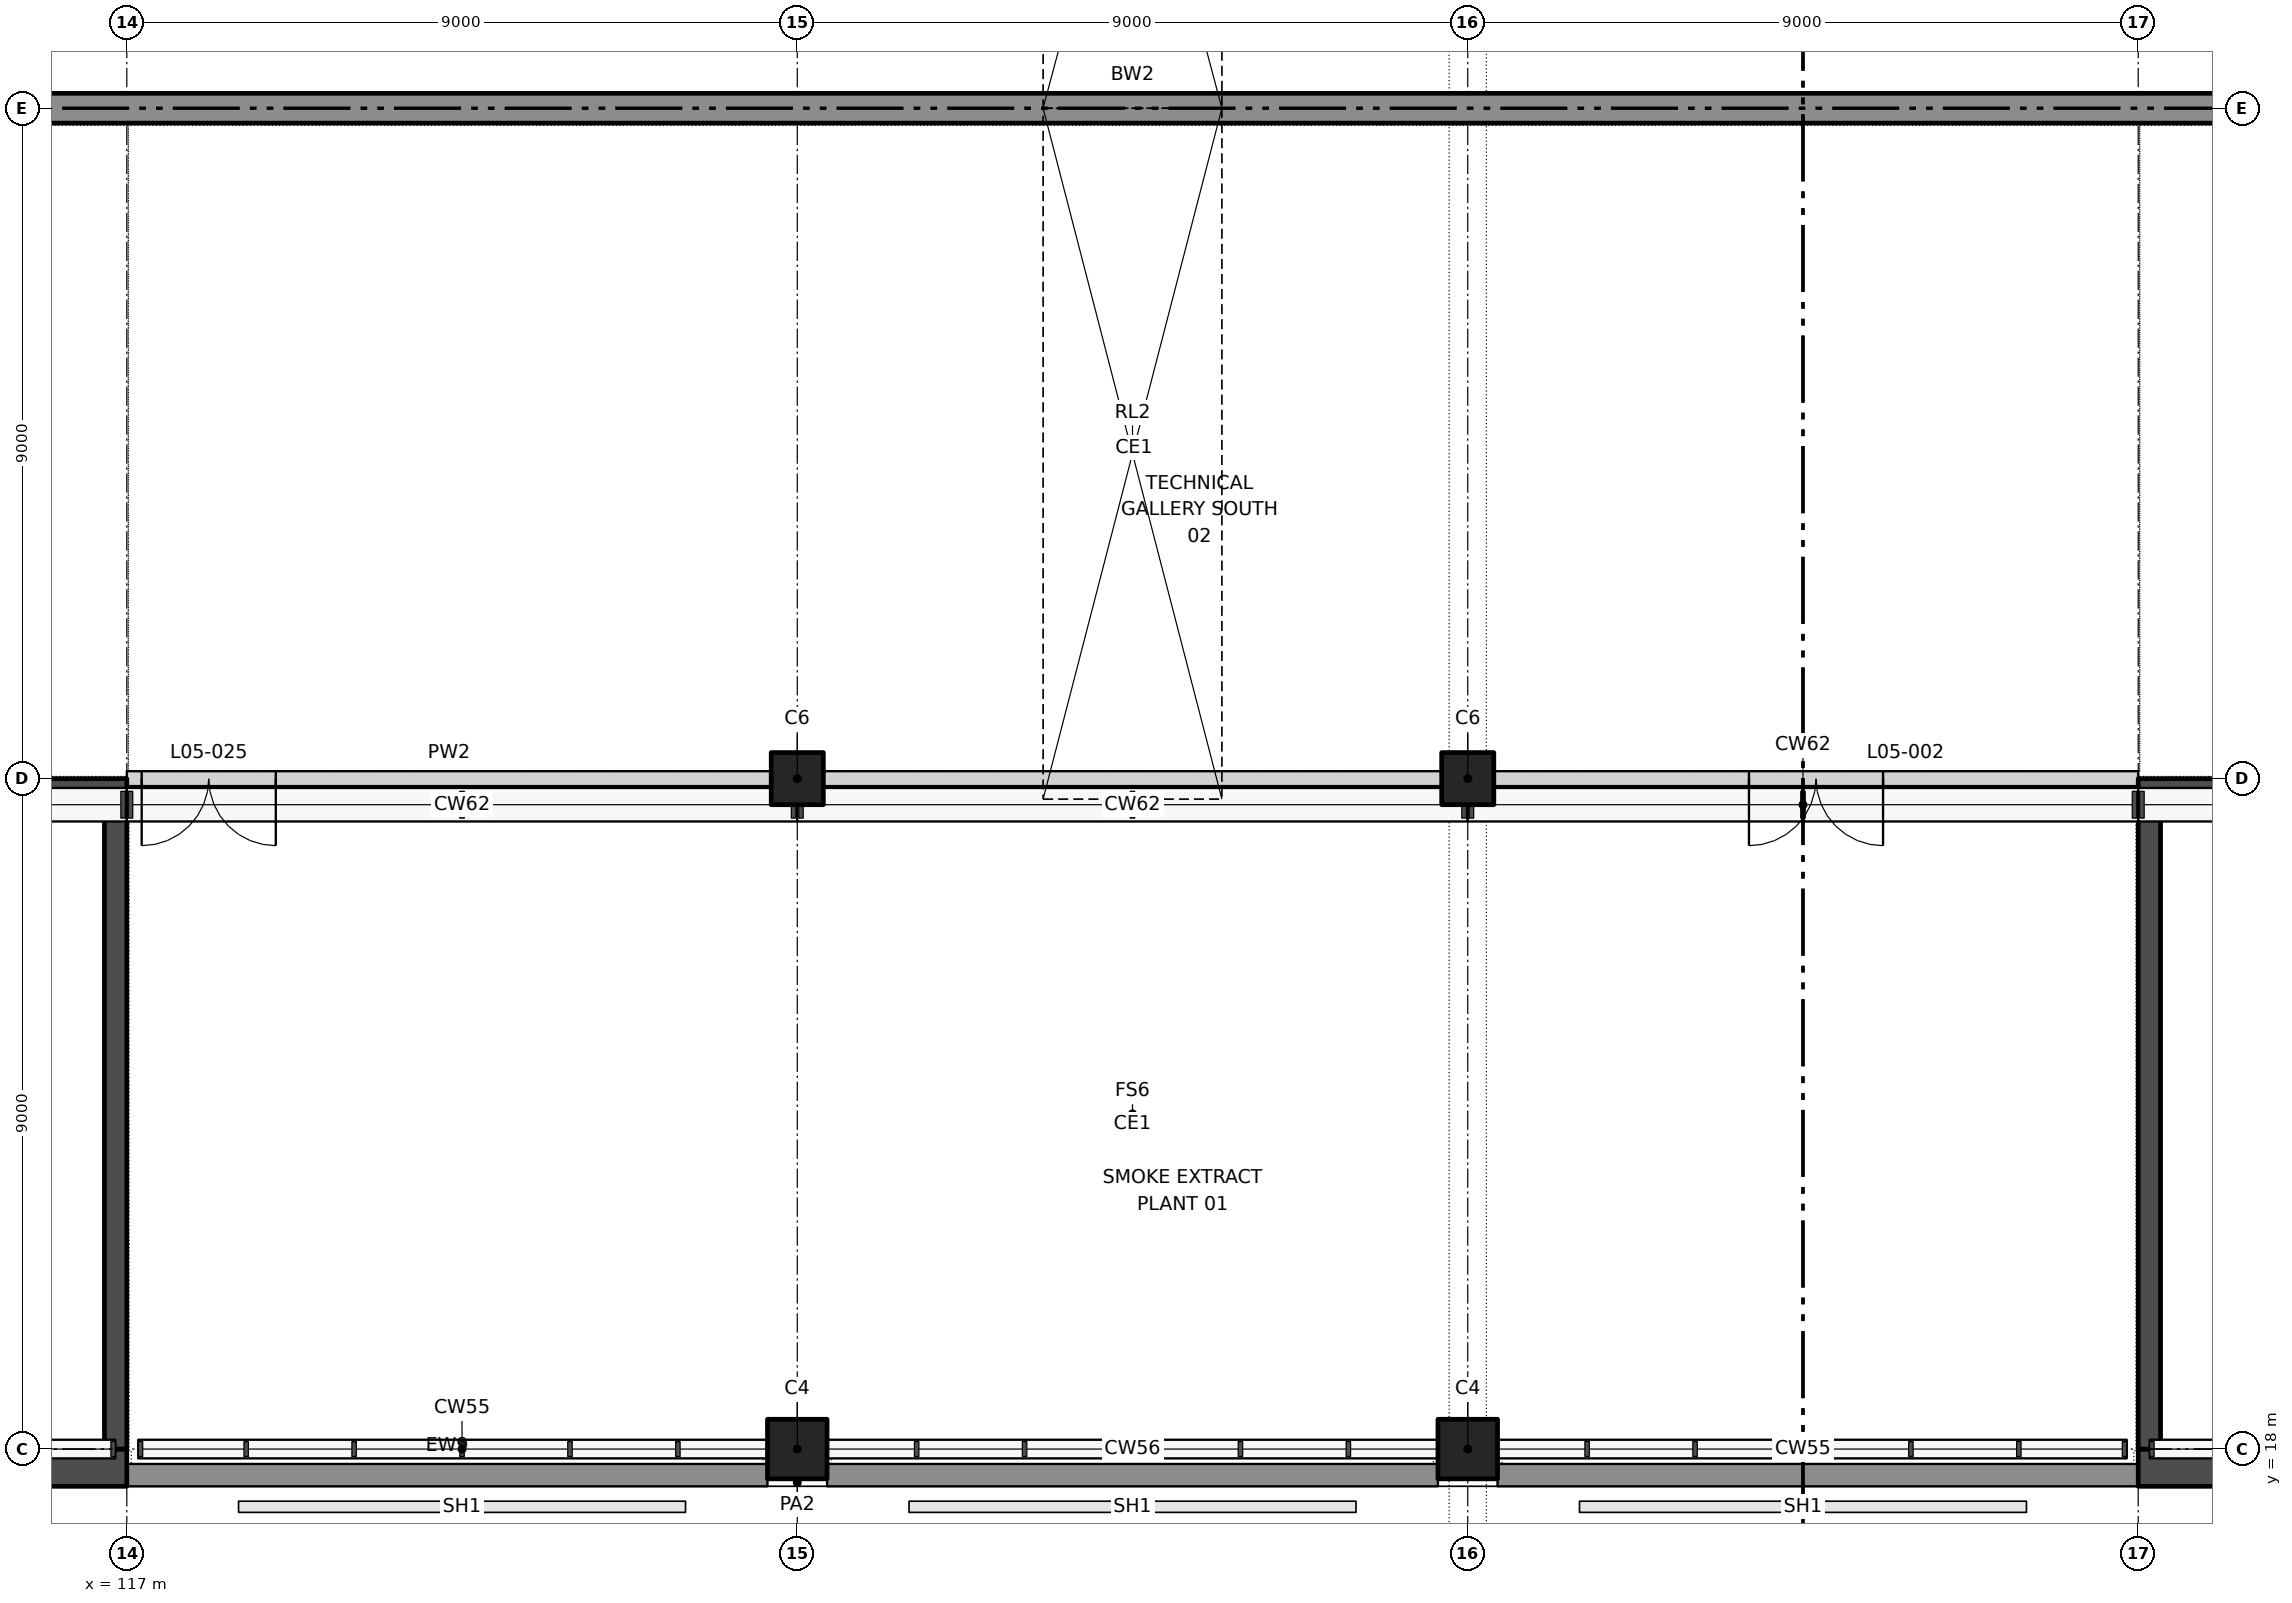
"""IFC4 building model, lengths in metres.
Left out: names, types, materials, properties, quantities, classifications, styles, units other than length and angle.
Written with IfcOpenShell. Run it as: python <this file> out.ifc"""

import sys

from ifc_helpers import new_model, si_unit, direction, frame, frame_2d, origin, origin_2d, place, context, subcontext, project, spatial, polyline, rectangle, outline, extrude, element, fill, save


model = new_model("IFC4")
c1 = context("Model", 3, precision=1e-05, world=origin(), true_north=direction((0.0, 1.0)))
c2 = subcontext(c1, "Body", "Model", "MODEL_VIEW")
j1 = project(units=[si_unit("LENGTHUNIT", "METRE"), si_unit("PLANEANGLEUNIT", "RADIAN")], contexts=[c1])
p1 = place(None, origin())
s1 = spatial("IfcSite", under=j1, at=p1, CompositionType="ELEMENT")
p2 = place(p1, origin())
s2 = spatial("IfcBuilding", under=s1, at=p2, CompositionType="ELEMENT")
p3 = place(p2, frame((0.0, 0.0, 33.5)))
s3 = spatial("IfcBuildingStorey", under=s2, at=p3, CompositionType="ELEMENT", Elevation=33.5)
for number, where, z_axis, x_axis in (
    (1, (126.0, 18.0, 0.0), (0.0, 0.0, 1.0), (1.0, 0.0, 0.0)),
    (2, (135.0, 18.0, 0.0), (0.0, 0.0, 1.0), (1.0, 0.0, 0.0)),
):
    element("IfcColumn", number, at=place(p3, frame(where, z_axis=z_axis, x_axis=x_axis)), inside=s3, PredefinedType="COLUMN", context=c2, shape_type="SweptSolid", body=[
        extrude(rectangle(XDim=0.8, YDim=0.8, at=origin_2d()), origin(), (0.0, 0.0, 1.0), 4.0),
    ])
for number, where, z_axis, x_axis in (
    (3, (126.0, 27.0, 0.0), (0.0, 0.0, 1.0), (1.0, 0.0, 0.0)),
    (4, (135.0, 27.0, 0.0), (0.0, 0.0, 1.0), (1.0, 0.0, 0.0)),
):
    element("IfcColumn", number, at=place(p3, frame(where, z_axis=z_axis, x_axis=x_axis)), inside=s3, PredefinedType="COLUMN", context=c2, shape_type="SweptSolid", body=[
        extrude(rectangle(XDim=0.7, YDim=0.7, at=origin_2d()), origin(), (0.0, 0.0, 1.0), 4.0),
    ])
p4 = place(p3, frame((90.0, 36.0, 0.0), z_axis=(0.0, 0.0, 1.0), x_axis=(1.0, 0.0, 0.0)))
e5 = element("IfcWall", 5, at=p4, inside=s3, PredefinedType="SOLIDWALL", context=c2, shape_type="SweptSolid", body=[
    extrude(rectangle(XDim=81.0, YDim=0.4, at=frame_2d((40.5, 0.0))), origin(), (0.0, 0.0, 1.0), 4.0),
])
p5 = place(p4, frame((3.9, 0.0, 0.0)))
e6 = element("IfcOpeningElement", 6, at=p5, cuts=e5, PredefinedType="OPENING", context=c2, shape_type="SweptSolid", body=[
    extrude(rectangle(XDim=1.2, YDim=2.1, at=frame_2d((0.6, 1.05))), frame((0.0, 0.21, 0.0), z_axis=(0.0, -1.0, 0.0), x_axis=(1.0, 0.0, 0.0)), (0.0, 0.0, 1.0), 0.42),
])
p6 = place(p4, frame((75.9, 0.0, 0.0)))
e7 = element("IfcOpeningElement", 7, at=p6, cuts=e5, PredefinedType="OPENING", context=c2, shape_type="SweptSolid", body=[
    extrude(rectangle(XDim=1.2, YDim=2.1, at=frame_2d((0.6, 1.05))), frame((0.0, 0.21, 0.0), z_axis=(0.0, -1.0, 0.0), x_axis=(1.0, 0.0, 0.0)), (0.0, 0.0, 1.0), 0.42),
])
p7 = place(p3, frame((135.35, 27.0, 0.0), z_axis=(0.0, 0.0, 1.0), x_axis=(1.0, 0.0, 0.0)))
e8 = element("IfcWall", 8, at=p7, inside=s3, PredefinedType="PARTITIONING", context=c2, shape_type="SweptSolid", body=[
    extrude(rectangle(XDim=8.65, YDim=0.2, at=frame_2d((4.325, 0.0))), origin(), (0.0, 0.0, 1.0), 4.0),
])
p8 = place(p7, frame((3.425, 0.0, 0.0)))
e9 = element("IfcOpeningElement", 9, at=p8, cuts=e8, PredefinedType="OPENING", context=c2, shape_type="SweptSolid", body=[
    extrude(rectangle(XDim=1.8, YDim=2.1, at=frame_2d((0.9, 1.05))), frame((0.0, 0.11, 0.0), z_axis=(0.0, -1.0, 0.0), x_axis=(1.0, 0.0, 0.0)), (0.0, 0.0, 1.0), 0.22),
])
p9 = place(p3, frame((126.35, 27.0, 0.0), z_axis=(0.0, 0.0, 1.0), x_axis=(1.0, 0.0, 0.0)))
e10 = element("IfcWall", 10, at=p9, inside=s3, PredefinedType="PARTITIONING", context=c2, shape_type="SweptSolid", body=[
    extrude(rectangle(XDim=8.3, YDim=0.2, at=frame_2d((4.15, 0.0))), origin(), (0.0, 0.0, 1.0), 4.0),
])
p10 = place(p3, frame((117.0, 27.0, 0.0), z_axis=(0.0, 0.0, 1.0), x_axis=(1.0, 0.0, 0.0)))
e11 = element("IfcWall", 11, at=p10, inside=s3, PredefinedType="PARTITIONING", context=c2, shape_type="SweptSolid", body=[
    extrude(rectangle(XDim=8.65, YDim=0.2, at=frame_2d((4.325, 0.0))), origin(), (0.0, 0.0, 1.0), 4.0),
])
p11 = place(p10, frame((0.2, 0.0, 0.0)))
e12 = element("IfcOpeningElement", 12, at=p11, cuts=e11, PredefinedType="OPENING", context=c2, shape_type="SweptSolid", body=[
    extrude(rectangle(XDim=1.8, YDim=2.1, at=frame_2d((0.9, 1.05))), frame((0.0, 0.11, 0.0), z_axis=(0.0, -1.0, 0.0), x_axis=(1.0, 0.0, 0.0)), (0.0, 0.0, 1.0), 0.22),
])
p12 = place(p3, frame((117.0, 17.65, 0.0), z_axis=(0.0, 0.0, 1.0), x_axis=(1.0, 0.0, 0.0)))
e13 = element("IfcWall", 13, at=p12, inside=s3, PredefinedType="SOLIDWALL", context=c2, shape_type="SweptSolid", body=[
    extrude(rectangle(XDim=8.6, YDim=0.3, at=frame_2d((4.3, 0.0))), origin(), (0.0, 0.0, 1.0), 4.0),
])
p13 = place(p3, frame((126.4, 17.65, 0.0), z_axis=(0.0, 0.0, 1.0), x_axis=(1.0, 0.0, 0.0)))
e14 = element("IfcWall", 14, at=p13, inside=s3, PredefinedType="SOLIDWALL", context=c2, shape_type="SweptSolid", body=[
    extrude(rectangle(XDim=8.2, YDim=0.3, at=frame_2d((4.1, 0.0))), origin(), (0.0, 0.0, 1.0), 4.0),
])
p14 = place(p3, frame((135.4, 17.65, 0.0), z_axis=(0.0, 0.0, 1.0), x_axis=(1.0, 0.0, 0.0)))
e15 = element("IfcWall", 15, at=p14, inside=s3, PredefinedType="SOLIDWALL", context=c2, shape_type="SweptSolid", body=[
    extrude(rectangle(XDim=8.6, YDim=0.3, at=frame_2d((4.3, 0.0))), origin(), (0.0, 0.0, 1.0), 4.0),
])
p15 = place(p3, frame((117.0, 26.85, 0.0), z_axis=(0.0, 0.0, 1.0), x_axis=(-1.0, 0.0, 0.0)))
e16 = element("IfcWall", 16, at=p15, inside=s3, PredefinedType="SHEAR", context=c2, shape_type="SweptSolid", body=[
    extrude(rectangle(XDim=18.0, YDim=0.3, at=frame_2d((9.0, 0.0))), origin(), (0.0, 0.0, 1.0), 4.0),
])
p16 = place(p15, frame((8.6, 0.0, 0.0)))
e17 = element("IfcOpeningElement", 17, at=p16, cuts=e16, PredefinedType="OPENING", context=c2, shape_type="SweptSolid", body=[
    extrude(rectangle(XDim=1.2, YDim=2.1, at=frame_2d((0.6, 1.05))), frame((0.0, 0.16, 0.0), z_axis=(0.0, -1.0, 0.0), x_axis=(1.0, 0.0, 0.0)), (0.0, 0.0, 1.0), 0.32),
])
p17 = place(p3, frame((117.0, 17.75, 0.0), z_axis=(0.0, 0.0, 1.0), x_axis=(-1.0, 0.0, 0.0)))
e18 = element("IfcWall", 18, at=p17, inside=s3, PredefinedType="SHEAR", context=c2, shape_type="SweptSolid", body=[
    extrude(rectangle(XDim=18.0, YDim=0.5, at=frame_2d((9.0, 0.0))), origin(), (0.0, 0.0, 1.0), 4.0),
])
p18 = place(p3, frame((116.85, 26.7, 0.0), z_axis=(0.0, 0.0, 1.0), x_axis=(0.0, -1.0, 0.0)))
e19 = element("IfcWall", 19, at=p18, inside=s3, PredefinedType="SHEAR", context=c2, shape_type="SweptSolid", body=[
    extrude(rectangle(XDim=8.7, YDim=0.3, at=frame_2d((4.35, 0.0))), origin(), (0.0, 0.0, 1.0), 4.0),
])
p19 = place(p3, frame((144.0, 26.85, 0.0), z_axis=(0.0, 0.0, 1.0), x_axis=(1.0, 0.0, 0.0)))
e20 = element("IfcWall", 20, at=p19, inside=s3, PredefinedType="SHEAR", context=c2, shape_type="SweptSolid", body=[
    extrude(rectangle(XDim=18.0, YDim=0.3, at=frame_2d((9.0, 0.0))), origin(), (0.0, 0.0, 1.0), 4.0),
])
p20 = place(p19, frame((8.6, 0.0, 0.0)))
e21 = element("IfcOpeningElement", 21, at=p20, cuts=e20, PredefinedType="OPENING", context=c2, shape_type="SweptSolid", body=[
    extrude(rectangle(XDim=1.2, YDim=2.1, at=frame_2d((0.6, 1.05))), frame((0.0, 0.16, 0.0), z_axis=(0.0, -1.0, 0.0), x_axis=(1.0, 0.0, 0.0)), (0.0, 0.0, 1.0), 0.32),
])
p21 = place(p3, frame((144.0, 17.75, 0.0), z_axis=(0.0, 0.0, 1.0), x_axis=(1.0, 0.0, 0.0)))
e22 = element("IfcWall", 22, at=p21, inside=s3, PredefinedType="SHEAR", context=c2, shape_type="SweptSolid", body=[
    extrude(rectangle(XDim=18.0, YDim=0.5, at=frame_2d((9.0, 0.0))), origin(), (0.0, 0.0, 1.0), 4.0),
])
p22 = place(p3, frame((144.15, 26.7, 0.0), z_axis=(0.0, 0.0, 1.0), x_axis=(0.0, -1.0, 0.0)))
e23 = element("IfcWall", 23, at=p22, inside=s3, PredefinedType="SHEAR", context=c2, shape_type="SweptSolid", body=[
    extrude(rectangle(XDim=8.7, YDim=0.3, at=frame_2d((4.35, 0.0))), origin(), (0.0, 0.0, 1.0), 4.0),
])
p23 = place(p8, frame((1.8, 0.0, 0.0), z_axis=(0.0, 0.0, 1.0), x_axis=(-1.0, 0.0, 0.0)))
e24 = element("IfcDoor", 24, at=p23, inside=s3, OperationType="DOUBLE_DOOR_DOUBLE_SWING", PredefinedType="DOOR", context=c2, shape_type="SweptSolid", body=[
    extrude(rectangle(XDim=1.8, YDim=2.1, at=frame_2d((0.9, 1.05))), frame((0.0, 0.025, 0.0), z_axis=(0.0, -1.0, 0.0), x_axis=(1.0, 0.0, 0.0)), (0.0, 0.0, 1.0), 0.05),
])
fill(e9, e24)
p24 = place(p11, frame((1.8, 0.0, 0.0), z_axis=(0.0, 0.0, 1.0), x_axis=(-1.0, 0.0, 0.0)))
e25 = element("IfcDoor", 25, at=p24, inside=s3, OperationType="DOUBLE_DOOR_DOUBLE_SWING", PredefinedType="DOOR", context=c2, shape_type="SweptSolid", body=[
    extrude(rectangle(XDim=1.8, YDim=2.1, at=frame_2d((0.9, 1.05))), frame((0.0, 0.025, 0.0), z_axis=(0.0, -1.0, 0.0), x_axis=(1.0, 0.0, 0.0)), (0.0, 0.0, 1.0), 0.05),
])
fill(e12, e25)
p25 = place(p2, frame((0.0, 0.0, 47.1)))
p26 = place(p25, frame((80.425, 26.425, 9.109), z_axis=(0.0, -0.072032280133, 0.99740230129), x_axis=(1.0, 0.0, 0.0)))
p27 = place(p26, origin())
e26 = element("IfcWindow", 26, at=p27, inside=s3, PartitioningType="SINGLE_PANEL", PredefinedType="SKYLIGHT", context=c2, shape_type="SweptSolid", body=[
    extrude(outline(polyline([(48.875, 0.301), (51.275, 0.301), (51.275, 9.6), (48.875, 9.6), (48.875, 0.301)])), origin(), (0.0, 0.0, -1.0), 0.05),
])
p28 = place(p26, origin())
e27 = element("IfcWindow", 27, at=p28, inside=s3, PartitioningType="SINGLE_PANEL", PredefinedType="SKYLIGHT", context=c2, shape_type="SweptSolid", body=[
    extrude(outline(polyline([(48.875, 9.6), (51.275, 9.6), (51.275, 18.623), (48.875, 18.623), (48.875, 9.6)])), origin(), (0.0, 0.0, -1.0), 0.05),
])
save(model, sys.argv[1])
